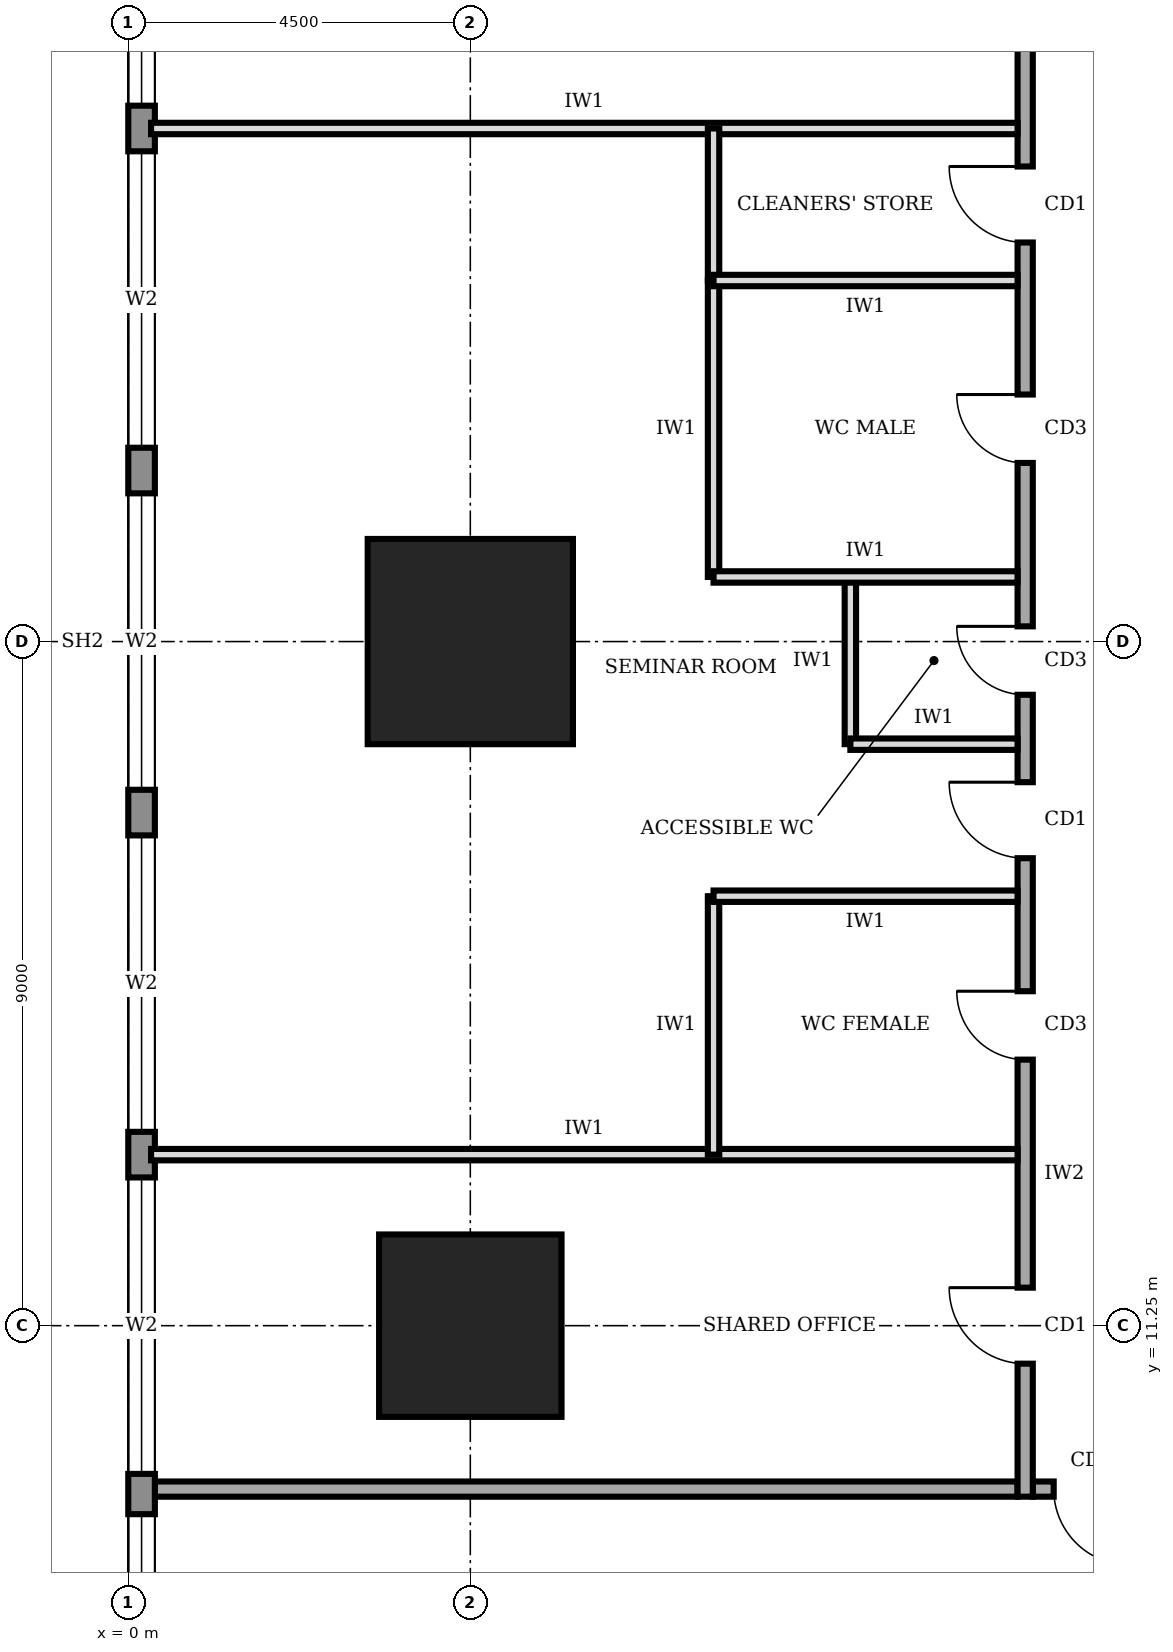
"""IFC4 building model, lengths in metres.
Left out: names, types, materials, properties, quantities, classifications, styles, units other than length and angle.
Written with IfcOpenShell. Run it as: python <this file> out.ifc"""

import sys

from ifc_helpers import new_model, si_unit, direction, frame, frame_2d, origin, origin_2d, place, context, subcontext, project, spatial, rectangle, extrude, element, fill, save


model = new_model("IFC4")
c1 = context("Model", 3, precision=1e-05, world=origin(), true_north=direction((0.0, 1.0)))
c2 = subcontext(c1, "Body", "Model", "MODEL_VIEW")
j1 = project(units=[si_unit("LENGTHUNIT", "METRE"), si_unit("PLANEANGLEUNIT", "RADIAN")], contexts=[c1])
p1 = place(None, origin())
s1 = spatial("IfcSite", under=j1, at=p1, CompositionType="ELEMENT")
p2 = place(p1, origin())
s2 = spatial("IfcBuilding", under=s1, at=p2, CompositionType="ELEMENT")
p3 = place(p2, frame((0.0, 0.0, 49.0)))
s3 = spatial("IfcBuildingStorey", under=s2, at=p3, CompositionType="ELEMENT", Elevation=49.0)
p4 = place(p3, frame((4.5, 11.25, 0.0), z_axis=(0.0, 0.0, 1.0), x_axis=(1.0, 0.0, 0.0)))
e1 = element("IfcColumn", 1, at=p4, inside=s3, PredefinedType="COLUMN", context=c2, shape_type="SweptSolid", body=[
    extrude(rectangle(XDim=2.4, YDim=2.4, at=origin_2d()), origin(), (0.0, 0.0, 1.0), 4.0),
])
p5 = place(p3, frame((4.5, 20.25, 0.0), z_axis=(0.0, 0.0, 1.0), x_axis=(1.0, 0.0, 0.0)))
e2 = element("IfcColumn", 2, at=p5, inside=s3, PredefinedType="COLUMN", context=c2, shape_type="SweptSolid", body=[
    extrude(rectangle(XDim=2.7, YDim=2.7, at=origin_2d()), origin(), (0.0, 0.0, 1.0), 4.0),
])
p6 = place(p3, frame((0.175, 35.98, 0.0), z_axis=(0.0, 0.0, 1.0), x_axis=(0.0, -1.0, 0.0)))
e3 = element("IfcWall", 3, at=p6, inside=s3, PredefinedType="STANDARD", context=c2, shape_type="SweptSolid", body=[
    extrude(rectangle(XDim=31.46, YDim=0.35, at=frame_2d((15.73, 0.0))), origin(), (0.0, 0.0, 1.0), 3.75),
])
p7 = place(p6, frame((27.21, 0.0, 0.6)))
e4 = element("IfcOpeningElement", 4, at=p7, cuts=e3, PredefinedType="OPENING", context=c2, shape_type="SweptSolid", body=[
    extrude(rectangle(XDim=3.9, YDim=2.6, at=frame_2d((1.95, 1.3))), frame((0.0, 0.185, 0.0), z_axis=(0.0, -1.0, 0.0), x_axis=(1.0, 0.0, 0.0)), (0.0, 0.0, 1.0), 0.37),
])
p8 = place(p6, frame((22.78, 0.0, 0.6)))
e5 = element("IfcOpeningElement", 5, at=p8, cuts=e3, PredefinedType="OPENING", context=c2, shape_type="SweptSolid", body=[
    extrude(rectangle(XDim=3.9, YDim=2.6, at=frame_2d((1.95, 1.3))), frame((0.0, 0.185, 0.0), z_axis=(0.0, -1.0, 0.0), x_axis=(1.0, 0.0, 0.0)), (0.0, 0.0, 1.0), 0.37),
])
p9 = place(p6, frame((18.28, 0.0, 0.6)))
e6 = element("IfcOpeningElement", 6, at=p9, cuts=e3, PredefinedType="OPENING", context=c2, shape_type="SweptSolid", body=[
    extrude(rectangle(XDim=3.9, YDim=2.6, at=frame_2d((1.95, 1.3))), frame((0.0, 0.185, 0.0), z_axis=(0.0, -1.0, 0.0), x_axis=(1.0, 0.0, 0.0)), (0.0, 0.0, 1.0), 0.37),
])
p10 = place(p6, frame((13.78, 0.0, 0.6)))
e7 = element("IfcOpeningElement", 7, at=p10, cuts=e3, PredefinedType="OPENING", context=c2, shape_type="SweptSolid", body=[
    extrude(rectangle(XDim=3.9, YDim=2.6, at=frame_2d((1.95, 1.3))), frame((0.0, 0.185, 0.0), z_axis=(0.0, -1.0, 0.0), x_axis=(1.0, 0.0, 0.0)), (0.0, 0.0, 1.0), 0.37),
])
p11 = place(p6, frame((9.28, 0.0, 0.6)))
e8 = element("IfcOpeningElement", 8, at=p11, cuts=e3, PredefinedType="OPENING", context=c2, shape_type="SweptSolid", body=[
    extrude(rectangle(XDim=3.9, YDim=2.6, at=frame_2d((1.95, 1.3))), frame((0.0, 0.185, 0.0), z_axis=(0.0, -1.0, 0.0), x_axis=(1.0, 0.0, 0.0)), (0.0, 0.0, 1.0), 0.37),
])
p12 = place(p6, frame((4.78, 0.0, 0.6)))
e9 = element("IfcOpeningElement", 9, at=p12, cuts=e3, PredefinedType="OPENING", context=c2, shape_type="SweptSolid", body=[
    extrude(rectangle(XDim=3.9, YDim=2.6, at=frame_2d((1.95, 1.3))), frame((0.0, 0.185, 0.0), z_axis=(0.0, -1.0, 0.0), x_axis=(1.0, 0.0, 0.0)), (0.0, 0.0, 1.0), 0.37),
])
p13 = place(p3, frame((11.9, 9.1, 0.0), z_axis=(0.0, 0.0, 1.0), x_axis=(1.0, 0.0, 0.0)))
e10 = element("IfcWall", 10, at=p13, inside=s3, PredefinedType="SOLIDWALL", context=c2, shape_type="SweptSolid", body=[
    extrude(rectangle(XDim=16.9, YDim=0.2, at=frame_2d((8.45, 0.0))), origin(), (0.0, 0.0, 1.0), 3.75),
])
p14 = place(p13, frame((0.275, 0.0, 0.0)))
e11 = element("IfcOpeningElement", 11, at=p14, cuts=e10, PredefinedType="OPENING", context=c2, shape_type="SweptSolid", body=[
    extrude(rectangle(XDim=1.0, YDim=2.1, at=frame_2d((0.5, 1.05))), frame((0.0, 0.11, 0.0), z_axis=(0.0, -1.0, 0.0), x_axis=(1.0, 0.0, 0.0)), (0.0, 0.0, 1.0), 0.22),
])
p15 = place(p13, frame((7.45, 0.0, 0.0)))
e12 = element("IfcOpeningElement", 12, at=p15, cuts=e10, PredefinedType="OPENING", context=c2, shape_type="SweptSolid", body=[
    extrude(rectangle(XDim=1.8, YDim=2.1, at=frame_2d((0.9, 1.05))), frame((0.0, 0.11, 0.0), z_axis=(0.0, -1.0, 0.0), x_axis=(1.0, 0.0, 0.0)), (0.0, 0.0, 1.0), 0.22),
])
p16 = place(p13, frame((15.425, 0.0, 0.0)))
e13 = element("IfcOpeningElement", 13, at=p16, cuts=e10, PredefinedType="OPENING", context=c2, shape_type="SweptSolid", body=[
    extrude(rectangle(XDim=1.0, YDim=2.1, at=frame_2d((0.5, 1.05))), frame((0.0, 0.11, 0.0), z_axis=(0.0, -1.0, 0.0), x_axis=(1.0, 0.0, 0.0)), (0.0, 0.0, 1.0), 0.22),
])
p17 = place(p3, frame((11.8, 32.8, 0.0), z_axis=(0.0, 0.0, 1.0), x_axis=(0.0, -1.0, 0.0)))
e14 = element("IfcWall", 14, at=p17, inside=s3, PredefinedType="SOLIDWALL", context=c2, shape_type="SweptSolid", body=[
    extrude(rectangle(XDim=23.8, YDim=0.2, at=frame_2d((11.9, 0.0))), origin(), (0.0, 0.0, 1.0), 3.75),
])
p18 = place(p17, frame((21.05, 0.0, 0.0)))
e15 = element("IfcOpeningElement", 15, at=p18, cuts=e14, PredefinedType="OPENING", context=c2, shape_type="SweptSolid", body=[
    extrude(rectangle(XDim=1.0, YDim=2.1, at=frame_2d((0.5, 1.05))), frame((0.0, 0.11, 0.0), z_axis=(0.0, -1.0, 0.0), x_axis=(1.0, 0.0, 0.0)), (0.0, 0.0, 1.0), 0.22),
])
p19 = place(p17, frame((17.15, 0.0, 0.0)))
e16 = element("IfcOpeningElement", 16, at=p19, cuts=e14, PredefinedType="OPENING", context=c2, shape_type="SweptSolid", body=[
    extrude(rectangle(XDim=0.9, YDim=2.1, at=frame_2d((0.45, 1.05))), frame((0.0, 0.11, 0.0), z_axis=(0.0, -1.0, 0.0), x_axis=(1.0, 0.0, 0.0)), (0.0, 0.0, 1.0), 0.22),
])
p20 = place(p17, frame((12.35, 0.0, 0.0)))
e17 = element("IfcOpeningElement", 17, at=p20, cuts=e14, PredefinedType="OPENING", context=c2, shape_type="SweptSolid", body=[
    extrude(rectangle(XDim=0.9, YDim=2.1, at=frame_2d((0.45, 1.05))), frame((0.0, 0.11, 0.0), z_axis=(0.0, -1.0, 0.0), x_axis=(1.0, 0.0, 0.0)), (0.0, 0.0, 1.0), 0.22),
])
p21 = place(p17, frame((9.3, 0.0, 0.0)))
e18 = element("IfcOpeningElement", 18, at=p21, cuts=e14, PredefinedType="OPENING", context=c2, shape_type="SweptSolid", body=[
    extrude(rectangle(XDim=0.9, YDim=2.1, at=frame_2d((0.45, 1.05))), frame((0.0, 0.11, 0.0), z_axis=(0.0, -1.0, 0.0), x_axis=(1.0, 0.0, 0.0)), (0.0, 0.0, 1.0), 0.22),
])
p22 = place(p17, frame((6.3, 0.0, 0.0)))
e19 = element("IfcOpeningElement", 19, at=p22, cuts=e14, PredefinedType="OPENING", context=c2, shape_type="SweptSolid", body=[
    extrude(rectangle(XDim=1.0, YDim=2.1, at=frame_2d((0.5, 1.05))), frame((0.0, 0.11, 0.0), z_axis=(0.0, -1.0, 0.0), x_axis=(1.0, 0.0, 0.0)), (0.0, 0.0, 1.0), 0.22),
])
p23 = place(p17, frame((14.4, 0.0, 0.0)))
e20 = element("IfcOpeningElement", 20, at=p23, cuts=e14, PredefinedType="OPENING", context=c2, shape_type="SweptSolid", body=[
    extrude(rectangle(XDim=1.0, YDim=2.1, at=frame_2d((0.5, 1.05))), frame((0.0, 0.11, 0.0), z_axis=(0.0, -1.0, 0.0), x_axis=(1.0, 0.0, 0.0)), (0.0, 0.0, 1.0), 0.22),
])
p24 = place(p17, frame((2.3, 0.0, 0.0)))
e21 = element("IfcOpeningElement", 21, at=p24, cuts=e14, PredefinedType="OPENING", context=c2, shape_type="SweptSolid", body=[
    extrude(rectangle(XDim=1.0, YDim=2.1, at=frame_2d((0.5, 1.05))), frame((0.0, 0.11, 0.0), z_axis=(0.0, -1.0, 0.0), x_axis=(1.0, 0.0, 0.0)), (0.0, 0.0, 1.0), 0.22),
])
p25 = place(p3, frame((0.3, 9.1, 0.0), z_axis=(0.0, 0.0, 1.0), x_axis=(1.0, 0.0, 0.0)))
e22 = element("IfcWall", 22, at=p25, inside=s3, PredefinedType="SOLIDWALL", context=c2, shape_type="SweptSolid", body=[
    extrude(rectangle(XDim=11.4, YDim=0.2, at=frame_2d((5.7, 0.0))), origin(), (0.0, 0.0, 1.0), 3.75),
])
for number, where, z_axis, x_axis in (
    (23, (0.3, 13.5, 0.0), (0.0, 0.0, 1.0), (1.0, 0.0, 0.0)),
    (24, (0.3, 27.0, 0.0), (0.0, 0.0, 1.0), (1.0, 0.0, 0.0)),
):
    element("IfcWall", number, at=place(p3, frame(where, z_axis=z_axis, x_axis=x_axis)), inside=s3, PredefinedType="PARTITIONING", context=c2, shape_type="SweptSolid", body=[
        extrude(rectangle(XDim=11.4, YDim=0.15, at=frame_2d((5.7, 0.0))), origin(), (0.0, 0.0, 1.0), 3.75),
    ])
p26 = place(p3, frame((11.7, 16.9, 0.0), z_axis=(0.0, 0.0, 1.0), x_axis=(-1.0, 0.0, 0.0)))
e25 = element("IfcWall", 25, at=p26, inside=s3, PredefinedType="PARTITIONING", context=c2, shape_type="SweptSolid", body=[
    extrude(rectangle(XDim=4.0, YDim=0.15, at=frame_2d((2.0, 0.0))), origin(), (0.0, 0.0, 1.0), 3.75),
])
p27 = place(p3, frame((11.7, 18.9, 0.0), z_axis=(0.0, 0.0, 1.0), x_axis=(-1.0, 0.0, 0.0)))
e26 = element("IfcWall", 26, at=p27, inside=s3, PredefinedType="PARTITIONING", context=c2, shape_type="SweptSolid", body=[
    extrude(rectangle(XDim=2.2, YDim=0.15, at=frame_2d((1.1, 0.0))), origin(), (0.0, 0.0, 1.0), 3.75),
])
p28 = place(p3, frame((11.7, 21.1, 0.0), z_axis=(0.0, 0.0, 1.0), x_axis=(-1.0, 0.0, 0.0)))
e27 = element("IfcWall", 27, at=p28, inside=s3, PredefinedType="PARTITIONING", context=c2, shape_type="SweptSolid", body=[
    extrude(rectangle(XDim=4.0, YDim=0.15, at=frame_2d((2.0, 0.0))), origin(), (0.0, 0.0, 1.0), 2.85),
])
p29 = place(p3, frame((11.7, 25.0, 0.0), z_axis=(0.0, 0.0, 1.0), x_axis=(-1.0, 0.0, 0.0)))
e28 = element("IfcWall", 28, at=p29, inside=s3, PredefinedType="PARTITIONING", context=c2, shape_type="SweptSolid", body=[
    extrude(rectangle(XDim=4.0, YDim=0.15, at=frame_2d((2.0, 0.0))), origin(), (0.0, 0.0, 1.0), 3.75),
])
p30 = place(p3, frame((7.7, 13.5, 0.0), z_axis=(0.0, 0.0, 1.0), x_axis=(0.0, 1.0, 0.0)))
e29 = element("IfcWall", 29, at=p30, inside=s3, PredefinedType="PARTITIONING", context=c2, shape_type="SweptSolid", body=[
    extrude(rectangle(XDim=3.4, YDim=0.15, at=frame_2d((1.7, 0.0))), origin(), (0.0, 0.0, 1.0), 3.75),
])
p31 = place(p3, frame((9.5, 18.9, 0.0), z_axis=(0.0, 0.0, 1.0), x_axis=(0.0, 1.0, 0.0)))
e30 = element("IfcWall", 30, at=p31, inside=s3, PredefinedType="PARTITIONING", context=c2, shape_type="SweptSolid", body=[
    extrude(rectangle(XDim=2.2, YDim=0.15, at=frame_2d((1.1, 0.0))), origin(), (0.0, 0.0, 1.0), 3.75),
])
p32 = place(p3, frame((7.7, 21.1, 0.0), z_axis=(0.0, 0.0, 1.0), x_axis=(0.0, 1.0, 0.0)))
e31 = element("IfcWall", 31, at=p32, inside=s3, PredefinedType="PARTITIONING", context=c2, shape_type="SweptSolid", body=[
    extrude(rectangle(XDim=3.9, YDim=0.15, at=frame_2d((1.95, 0.0))), origin(), (0.0, 0.0, 1.0), 3.75),
])
p33 = place(p3, frame((7.7, 25.0, 0.0), z_axis=(0.0, 0.0, 1.0), x_axis=(0.0, 1.0, 0.0)))
e32 = element("IfcWall", 32, at=p33, inside=s3, PredefinedType="PARTITIONING", context=c2, shape_type="SweptSolid", body=[
    extrude(rectangle(XDim=2.0, YDim=0.15, at=frame_2d((1.0, 0.0))), origin(), (0.0, 0.0, 1.0), 3.75),
])
p34 = place(p7, origin())
e33 = element("IfcWindow", 33, at=p34, inside=s3, PartitioningType="SINGLE_PANEL", PredefinedType="WINDOW", context=c2, shape_type="SweptSolid", body=[
    extrude(rectangle(XDim=3.9, YDim=2.6, at=frame_2d((1.95, 1.3))), frame((0.0, 0.03, 0.0), z_axis=(0.0, -1.0, 0.0), x_axis=(1.0, 0.0, 0.0)), (0.0, 0.0, 1.0), 0.06),
])
fill(e4, e33)
p35 = place(p8, origin())
e34 = element("IfcWindow", 34, at=p35, inside=s3, PartitioningType="SINGLE_PANEL", PredefinedType="WINDOW", context=c2, shape_type="SweptSolid", body=[
    extrude(rectangle(XDim=3.9, YDim=2.6, at=frame_2d((1.95, 1.3))), frame((0.0, 0.03, 0.0), z_axis=(0.0, -1.0, 0.0), x_axis=(1.0, 0.0, 0.0)), (0.0, 0.0, 1.0), 0.06),
])
fill(e5, e34)
p36 = place(p9, origin())
e35 = element("IfcWindow", 35, at=p36, inside=s3, PartitioningType="SINGLE_PANEL", PredefinedType="WINDOW", context=c2, shape_type="SweptSolid", body=[
    extrude(rectangle(XDim=3.9, YDim=2.6, at=frame_2d((1.95, 1.3))), frame((0.0, 0.03, 0.0), z_axis=(0.0, -1.0, 0.0), x_axis=(1.0, 0.0, 0.0)), (0.0, 0.0, 1.0), 0.06),
])
fill(e6, e35)
p37 = place(p10, origin())
e36 = element("IfcWindow", 36, at=p37, inside=s3, PartitioningType="SINGLE_PANEL", PredefinedType="WINDOW", context=c2, shape_type="SweptSolid", body=[
    extrude(rectangle(XDim=3.9, YDim=2.6, at=frame_2d((1.95, 1.3))), frame((0.0, 0.03, 0.0), z_axis=(0.0, -1.0, 0.0), x_axis=(1.0, 0.0, 0.0)), (0.0, 0.0, 1.0), 0.06),
])
fill(e7, e36)
p38 = place(p11, origin())
e37 = element("IfcWindow", 37, at=p38, inside=s3, PartitioningType="SINGLE_PANEL", PredefinedType="WINDOW", context=c2, shape_type="SweptSolid", body=[
    extrude(rectangle(XDim=3.9, YDim=2.6, at=frame_2d((1.95, 1.3))), frame((0.0, 0.03, 0.0), z_axis=(0.0, -1.0, 0.0), x_axis=(1.0, 0.0, 0.0)), (0.0, 0.0, 1.0), 0.06),
])
fill(e8, e37)
p39 = place(p12, origin())
e38 = element("IfcWindow", 38, at=p39, inside=s3, PartitioningType="SINGLE_PANEL", PredefinedType="WINDOW", context=c2, shape_type="SweptSolid", body=[
    extrude(rectangle(XDim=3.9, YDim=2.6, at=frame_2d((1.95, 1.3))), frame((0.0, 0.03, 0.0), z_axis=(0.0, -1.0, 0.0), x_axis=(1.0, 0.0, 0.0)), (0.0, 0.0, 1.0), 0.06),
])
fill(e9, e38)
p40 = place(p14, frame((1.0, 0.0, 0.0), z_axis=(0.0, 0.0, 1.0), x_axis=(-1.0, 0.0, 0.0)))
e39 = element("IfcDoor", 39, at=p40, inside=s3, OperationType="SINGLE_SWING_LEFT", PredefinedType="DOOR", context=c2, shape_type="SweptSolid", body=[
    extrude(rectangle(XDim=1.0, YDim=2.1, at=frame_2d((0.5, 1.05))), frame((0.0, 0.025, 0.0), z_axis=(0.0, -1.0, 0.0), x_axis=(1.0, 0.0, 0.0)), (0.0, 0.0, 1.0), 0.05),
])
fill(e11, e39)
p41 = place(p18, frame((1.0, 0.0, 0.0), z_axis=(0.0, 0.0, 1.0), x_axis=(-1.0, 0.0, 0.0)))
e40 = element("IfcDoor", 40, at=p41, inside=s3, OperationType="SINGLE_SWING_RIGHT", PredefinedType="DOOR", context=c2, shape_type="SweptSolid", body=[
    extrude(rectangle(XDim=1.0, YDim=2.1, at=frame_2d((0.5, 1.05))), frame((0.0, 0.025, 0.0), z_axis=(0.0, -1.0, 0.0), x_axis=(1.0, 0.0, 0.0)), (0.0, 0.0, 1.0), 0.05),
])
fill(e15, e40)
p42 = place(p19, frame((0.9, 0.0, 0.0), z_axis=(0.0, 0.0, 1.0), x_axis=(-1.0, 0.0, 0.0)))
e41 = element("IfcDoor", 41, at=p42, inside=s3, OperationType="SINGLE_SWING_RIGHT", PredefinedType="DOOR", context=c2, shape_type="SweptSolid", body=[
    extrude(rectangle(XDim=0.9, YDim=2.1, at=frame_2d((0.45, 1.05))), frame((0.0, 0.025, 0.0), z_axis=(0.0, -1.0, 0.0), x_axis=(1.0, 0.0, 0.0)), (0.0, 0.0, 1.0), 0.05),
])
fill(e16, e41)
p43 = place(p20, frame((0.9, 0.0, 0.0), z_axis=(0.0, 0.0, 1.0), x_axis=(-1.0, 0.0, 0.0)))
e42 = element("IfcDoor", 42, at=p43, inside=s3, OperationType="SINGLE_SWING_RIGHT", PredefinedType="DOOR", context=c2, shape_type="SweptSolid", body=[
    extrude(rectangle(XDim=0.9, YDim=2.1, at=frame_2d((0.45, 1.05))), frame((0.0, 0.025, 0.0), z_axis=(0.0, -1.0, 0.0), x_axis=(1.0, 0.0, 0.0)), (0.0, 0.0, 1.0), 0.05),
])
fill(e17, e42)
p44 = place(p21, frame((0.9, 0.0, 0.0), z_axis=(0.0, 0.0, 1.0), x_axis=(-1.0, 0.0, 0.0)))
e43 = element("IfcDoor", 43, at=p44, inside=s3, OperationType="SINGLE_SWING_RIGHT", PredefinedType="DOOR", context=c2, shape_type="SweptSolid", body=[
    extrude(rectangle(XDim=0.9, YDim=2.1, at=frame_2d((0.45, 1.05))), frame((0.0, 0.025, 0.0), z_axis=(0.0, -1.0, 0.0), x_axis=(1.0, 0.0, 0.0)), (0.0, 0.0, 1.0), 0.05),
])
fill(e18, e43)
p45 = place(p22, frame((1.0, 0.0, 0.0), z_axis=(0.0, 0.0, 1.0), x_axis=(-1.0, 0.0, 0.0)))
e44 = element("IfcDoor", 44, at=p45, inside=s3, OperationType="SINGLE_SWING_RIGHT", PredefinedType="DOOR", context=c2, shape_type="SweptSolid", body=[
    extrude(rectangle(XDim=1.0, YDim=2.1, at=frame_2d((0.5, 1.05))), frame((0.0, 0.025, 0.0), z_axis=(0.0, -1.0, 0.0), x_axis=(1.0, 0.0, 0.0)), (0.0, 0.0, 1.0), 0.05),
])
fill(e19, e44)
p46 = place(p23, frame((1.0, 0.0, 0.0), z_axis=(0.0, 0.0, 1.0), x_axis=(-1.0, 0.0, 0.0)))
e45 = element("IfcDoor", 45, at=p46, inside=s3, OperationType="SINGLE_SWING_RIGHT", PredefinedType="DOOR", context=c2, shape_type="SweptSolid", body=[
    extrude(rectangle(XDim=1.0, YDim=2.1, at=frame_2d((0.5, 1.05))), frame((0.0, 0.025, 0.0), z_axis=(0.0, -1.0, 0.0), x_axis=(1.0, 0.0, 0.0)), (0.0, 0.0, 1.0), 0.05),
])
fill(e20, e45)
save(model, sys.argv[1])
